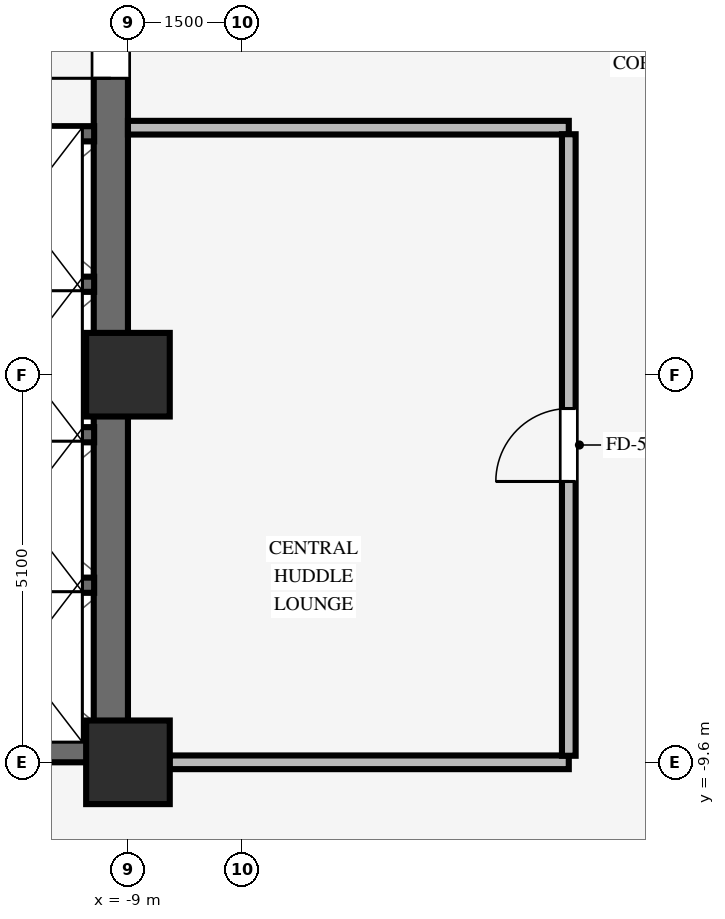
"""IFC4 building model, lengths in metres.
Left out: names, types, materials, properties, quantities, classifications, styles, units other than length and angle.
Written with IfcOpenShell. Run it as: python <this file> out.ifc"""

import sys

from ifc_helpers import new_model, si_unit, direction, frame, frame_2d, origin, origin_2d, place, context, subcontext, project, spatial, rectangle, extrude, source, transform, mapped, element, fill, save


model = new_model("IFC4")
c1 = context("Model", 3, precision=1e-05, world=origin(), true_north=direction((0.0, 1.0)))
c2 = subcontext(c1, "Body", "Model", "MODEL_VIEW")
j1 = project(units=[si_unit("LENGTHUNIT", "METRE"), si_unit("PLANEANGLEUNIT", "RADIAN")], contexts=[c1])
p1 = place(None, origin())
s1 = spatial("IfcSite", under=j1, at=p1, CompositionType="ELEMENT")
p2 = place(p1, origin())
s2 = spatial("IfcBuilding", under=s1, at=p2, CompositionType="ELEMENT")
p3 = place(p2, frame((0.0, 0.0, 89.65)))
s3 = spatial("IfcBuildingStorey", under=s2, at=p3, CompositionType="ELEMENT", Elevation=89.65)
p4 = place(p3, frame((-17.5, -9.375, 0.0), z_axis=(0.0, 0.0, 1.0), x_axis=(1.0, 0.0, 0.0)))
e1 = element("IfcWall", 1, at=p4, inside=s3, PredefinedType="SHEAR", context=c2, shape_type="SweptSolid", body=[
    extrude(rectangle(XDim=8.5, YDim=0.45, at=frame_2d((4.25, 0.0))), origin(), (0.0, 0.0, 1.0), 3.25),
])
p5 = place(p3, frame((-9.225, -9.155, 0.0), z_axis=(0.0, 0.0, 1.0), x_axis=(0.0, 1.0, 0.0)))
e2 = element("IfcWall", 2, at=p5, inside=s3, PredefinedType="SHEAR", context=c2, shape_type="SweptSolid", body=[
    extrude(rectangle(XDim=18.31, YDim=0.45, at=frame_2d((9.155, 0.0))), origin(), (0.0, 0.0, 1.0), 3.25),
])
p6 = place(p5, frame((8.555, 0.0, 0.0)))
e3 = element("IfcOpeningElement", 3, at=p6, cuts=e2, PredefinedType="OPENING", context=c2, shape_type="SweptSolid", body=[
    extrude(rectangle(XDim=1.2, YDim=2.15, at=frame_2d((0.6, 1.075))), frame((0.0, 0.235, 0.0), z_axis=(0.0, -1.0, 0.0), x_axis=(1.0, 0.0, 0.0)), (0.0, 0.0, 1.0), 0.47),
])
for number, where, z_axis, x_axis in (
    (4, (-9.0, -9.6, 0.0), (0.0, 0.0, 1.0), (1.0, 0.0, 0.0)),
    (5, (-9.0, -4.5, 0.0), (0.0, 0.0, 1.0), (1.0, 0.0, 0.0)),
):
    element("IfcColumn", number, at=place(p3, frame(where, z_axis=z_axis, x_axis=x_axis)), inside=s3, PredefinedType="COLUMN", context=c2, shape_type="SweptSolid", body=[
        extrude(rectangle(XDim=1.1, YDim=1.1, at=origin_2d()), origin(), (0.0, 0.0, 1.0), 3.25),
    ])
for number, where, z_axis, x_axis in (
    (6, (-11.505, -7.27, 0.0), (0.0, 0.0, 1.0), (1.0, 0.0, 0.0)),
    (7, (-11.505, -5.29, 0.0), (0.0, 0.0, 1.0), (1.0, 0.0, 0.0)),
    (8, (-11.505, -3.31, 0.0), (0.0, 0.0, 1.0), (1.0, 0.0, 0.0)),
    (9, (-11.505, -1.33, 0.0), (0.0, 0.0, 1.0), (1.0, 0.0, 0.0)),
):
    element("IfcWall", number, at=place(p3, frame(where, z_axis=z_axis, x_axis=x_axis)), inside=s3, PredefinedType="SHEAR", context=c2, shape_type="SweptSolid", body=[
        extrude(rectangle(XDim=2.06, YDim=0.2, at=frame_2d((1.03, 0.0))), origin(), (0.0, 0.0, 1.0), 3.25),
    ])
p7 = place(p3, frame((-8.454, -9.6, 0.0), z_axis=(0.0, 0.0, 1.0), x_axis=(1.0, 0.0, 0.0)))
e10 = element("IfcWall", 10, at=p7, inside=s3, PredefinedType="PARTITIONING", context=c2, shape_type="SweptSolid", body=[
    extrude(rectangle(XDim=5.254, YDim=0.18, at=frame_2d((2.627, 0.0))), origin(), (0.0, 0.0, 1.0), 2.285),
])
p8 = place(p3, frame((-9.0, -1.25, 0.0), z_axis=(0.0, 0.0, 1.0), x_axis=(1.0, 0.0, 0.0)))
e11 = element("IfcWall", 11, at=p8, inside=s3, PredefinedType="PARTITIONING", context=c2, shape_type="SweptSolid", body=[
    extrude(rectangle(XDim=5.8, YDim=0.18, at=frame_2d((2.9, 0.0))), origin(), (0.0, 0.0, 1.0), 3.24),
])
p9 = place(p3, frame((-3.2, -9.514, 0.0), z_axis=(0.0, 0.0, 1.0), x_axis=(0.0, 1.0, 0.0)))
e12 = element("IfcWall", 12, at=p9, inside=s3, PredefinedType="PARTITIONING", context=c2, shape_type="SweptSolid", body=[
    extrude(rectangle(XDim=8.178, YDim=0.18, at=frame_2d((4.089, 0.0))), origin(), (0.0, 0.0, 1.0), 3.24),
])
p10 = place(p9, frame((3.609, 0.0, 0.0)))
e13 = element("IfcOpeningElement", 13, at=p10, cuts=e12, PredefinedType="OPENING", context=c2, shape_type="SweptSolid", body=[
    extrude(rectangle(XDim=0.96, YDim=2.1, at=frame_2d((0.48, 1.05))), frame((0.0, 0.1, 0.0), z_axis=(0.0, -1.0, 0.0), x_axis=(1.0, 0.0, 0.0)), (0.0, 0.0, 1.0), 0.2),
])
m1 = source(origin(), c2, "Body", "SweptSolid", [
    extrude(rectangle(XDim=1.2, YDim=2.15, at=frame_2d((0.6, 1.075))), frame((0.0, 0.025, 0.0), z_axis=(0.0, -1.0, 0.0), x_axis=(1.0, 0.0, 0.0)), (0.0, 0.0, 1.0), 0.05),
])
p11 = place(p6, origin())
e14 = element("IfcDoor", 14, at=p11, inside=s3, OperationType="SINGLE_SWING_LEFT", PredefinedType="DOOR", context=c2, shape_type="MappedRepresentation", body=[
    mapped(m1, transform((0.0, 0.0, 0.0), scale=1.0)),
])
fill(e3, e14)
m2 = source(origin(), c2, "Body", "SweptSolid", [
    extrude(rectangle(XDim=0.96, YDim=2.1, at=frame_2d((0.48, 1.05))), frame((0.0, 0.025, 0.0), z_axis=(0.0, -1.0, 0.0), x_axis=(1.0, 0.0, 0.0)), (0.0, 0.0, 1.0), 0.05),
])
p12 = place(p10, origin())
e15 = element("IfcDoor", 15, at=p12, inside=s3, OperationType="SINGLE_SWING_LEFT", PredefinedType="DOOR", context=c2, shape_type="MappedRepresentation", body=[
    mapped(m2, transform((0.0, 0.0, 0.0), scale=1.0)),
])
fill(e13, e15)
save(model, sys.argv[1])
